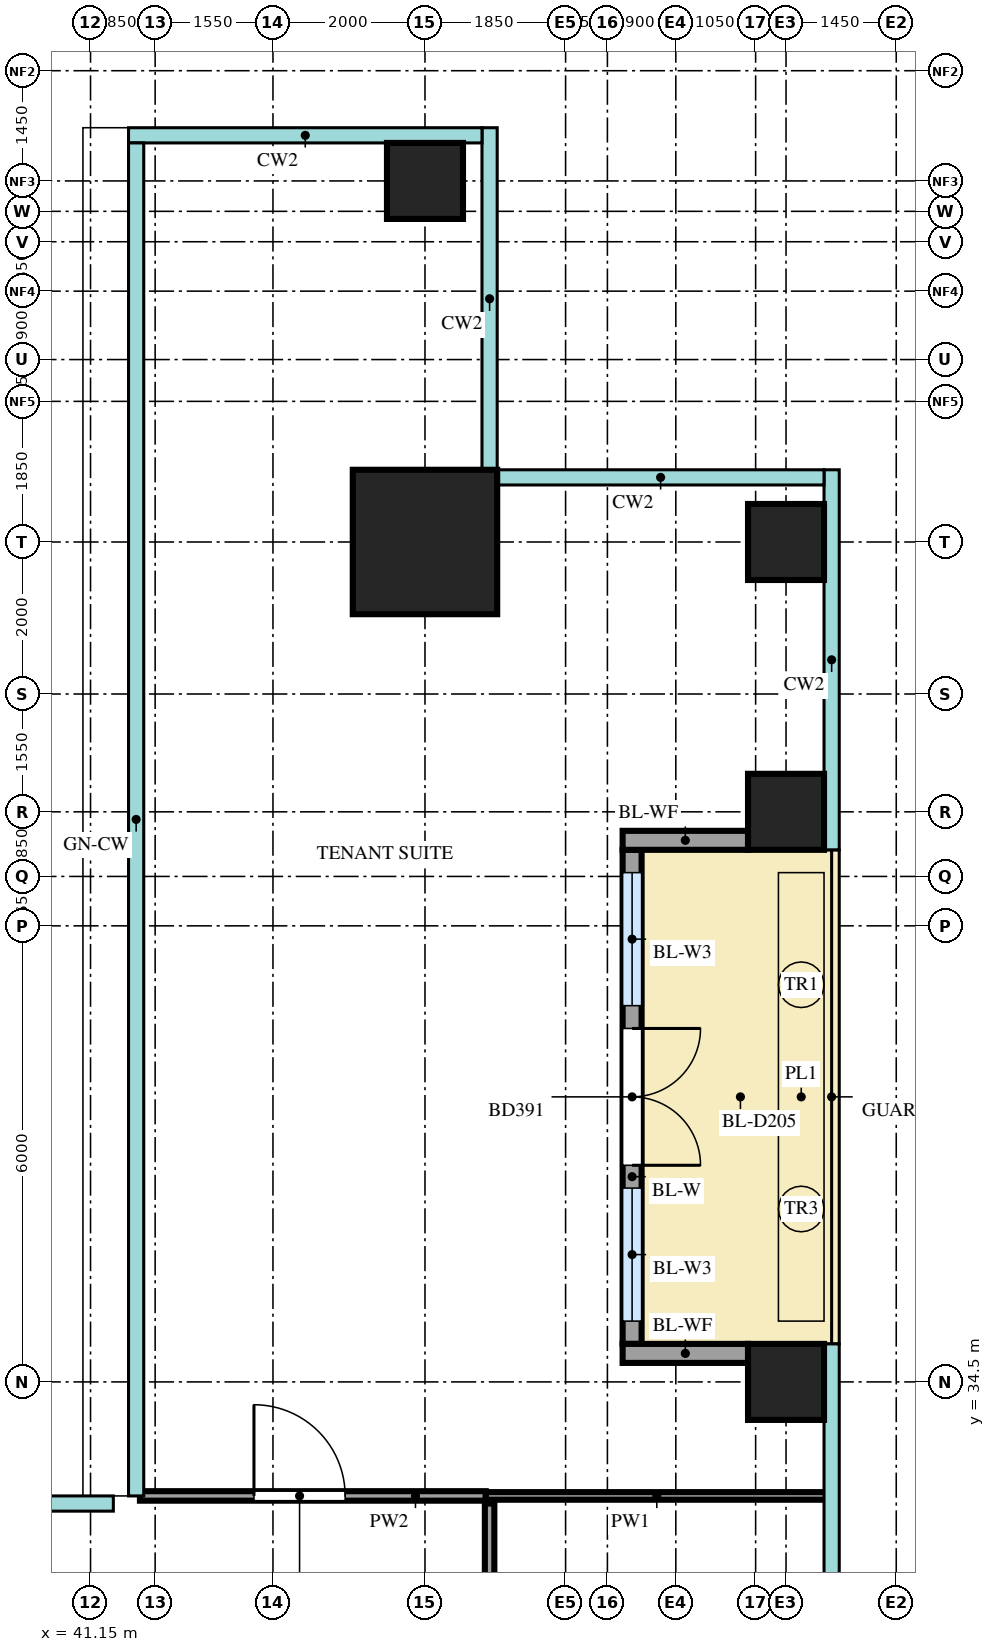
"""IFC4 building model, lengths in metres.
Left out: names, types, materials, properties, quantities, classifications, styles, units other than length and angle.
Written with IfcOpenShell. Run it as: python <this file> out.ifc"""

import sys

from ifc_helpers import new_model, si_unit, direction, frame, frame_2d, origin, origin_2d, place, context, subcontext, project, spatial, rectangle, extrude, source, transform, mapped, element, fill, save


model = new_model("IFC4")
c1 = context("Model", 3, precision=1e-05, world=origin(), true_north=direction((0.0, 1.0)))
c2 = subcontext(c1, "Body", "Model", "MODEL_VIEW")
j1 = project(units=[si_unit("LENGTHUNIT", "METRE"), si_unit("PLANEANGLEUNIT", "RADIAN")], contexts=[c1])
p1 = place(None, origin())
s1 = spatial("IfcSite", under=j1, at=p1, CompositionType="ELEMENT")
p2 = place(p1, origin())
s2 = spatial("IfcBuilding", under=s1, at=p2, CompositionType="ELEMENT")
p3 = place(p2, frame((0.0, 0.0, 180.7)))
s3 = spatial("IfcBuildingStorey", under=s2, at=p3, CompositionType="ELEMENT", Elevation=180.7)
m1 = source(origin(), c2, "Body", "SweptSolid", [
    extrude(rectangle(XDim=1.9, YDim=1.9, at=origin_2d()), origin(), (0.0, 0.0, 1.0), 4.0),
])
p4 = place(p3, frame((45.55, 45.55, 0.0), z_axis=(0.0, 0.0, 1.0), x_axis=(1.0, 0.0, 0.0)))
e1 = element("IfcColumn", 1, at=p4, inside=s3, PredefinedType="COLUMN", context=c2, shape_type="MappedRepresentation", body=[
    mapped(m1, transform((0.0, 0.0, 0.0))),
])
m2 = source(origin(), c2, "Body", "SweptSolid", [
    extrude(rectangle(XDim=1.0, YDim=1.0, at=origin_2d()), origin(), (0.0, 0.0, 1.0), 3.75),
])
for number, where, z_axis, x_axis in (
    (2, (50.3, 34.5, 0.0), (0.0, 0.0, 1.0), (1.0, 0.0, 0.0)),
    (3, (50.3, 42.0, 0.0), (0.0, 0.0, 1.0), (1.0, 0.0, 0.0)),
    (4, (50.3, 45.55, 0.0), (0.0, 0.0, 1.0), (1.0, 0.0, 0.0)),
    (5, (45.55, 50.3, 0.0), (0.0, 0.0, 1.0), (1.0, 0.0, 0.0)),
):
    element("IfcColumn", number, at=place(p3, frame(where, z_axis=z_axis, x_axis=x_axis)), inside=s3, PredefinedType="COLUMN", context=c2, shape_type="MappedRepresentation", body=[
        mapped(m2, transform((0.0, 0.0, 0.0))),
    ])
m3 = source(origin(), c2, "Body", "SweptSolid", [
    extrude(rectangle(XDim=6.5, YDim=0.25, at=frame_2d((3.25, 0.0))), origin(), (0.0, 0.0, 1.0), 3.75),
])
p5 = place(p3, frame((48.275, 35.0, 0.0), z_axis=(0.0, 0.0, 1.0), x_axis=(0.0, 1.0, 0.0)))
e6 = element("IfcWall", 6, at=p5, inside=s3, PredefinedType="SOLIDWALL", context=c2, shape_type="MappedRepresentation", body=[
    mapped(m3, transform((0.0, 0.0, 0.0))),
])
m4 = source(origin(), c2, "Body", "SweptSolid", [
    extrude(rectangle(XDim=1.75, YDim=2.4, at=frame_2d((0.875, 1.2))), frame((0.0, 0.135, 0.0), z_axis=(0.0, -1.0, 0.0), x_axis=(1.0, 0.0, 0.0)), (0.0, 0.0, 1.0), 0.27),
])
p6 = place(p5, frame((0.3, 0.0, 0.0)))
e7 = element("IfcOpeningElement", 7, at=p6, cuts=e6, PredefinedType="OPENING", context=c2, shape_type="MappedRepresentation", body=[
    mapped(m4, transform((0.0, 0.0, 0.0))),
])
p7 = place(p5, frame((4.45, 0.0, 0.0)))
e8 = element("IfcOpeningElement", 8, at=p7, cuts=e6, PredefinedType="OPENING", context=c2, shape_type="MappedRepresentation", body=[
    mapped(m4, transform((0.0, 0.0, 0.0))),
])
m5 = source(origin(), c2, "Body", "SweptSolid", [
    extrude(rectangle(XDim=1.8, YDim=2.4, at=frame_2d((0.9, 1.2))), frame((0.0, 0.135, 0.0), z_axis=(0.0, -1.0, 0.0), x_axis=(1.0, 0.0, 0.0)), (0.0, 0.0, 1.0), 0.27),
])
p8 = place(p5, frame((2.35, 0.0, 0.0)))
e9 = element("IfcOpeningElement", 9, at=p8, cuts=e6, PredefinedType="OPENING", context=c2, shape_type="MappedRepresentation", body=[
    mapped(m5, transform((0.0, 0.0, 0.0))),
])
m6 = source(origin(), c2, "Body", "SweptSolid", [
    extrude(rectangle(XDim=1.65, YDim=0.25, at=frame_2d((0.825, 0.0))), origin(), (0.0, 0.0, 1.0), 3.45),
])
for number, where, z_axis, x_axis in (
    (10, (49.8, 34.875, 0.0), (0.0, 0.0, 1.0), (-1.0, 0.0, 0.0)),
    (11, (49.8, 41.625, 0.0), (0.0, 0.0, 1.0), (-1.0, 0.0, 0.0)),
):
    element("IfcWall", number, at=place(p3, frame(where, z_axis=z_axis, x_axis=x_axis)), inside=s3, PredefinedType="SOLIDWALL", context=c2, shape_type="MappedRepresentation", body=[
        mapped(m6, transform((0.0, 0.0, 0.0))),
    ])
m7 = source(origin(), c2, "Body", "SweptSolid", [
    extrude(rectangle(XDim=3.2, YDim=0.125, at=frame_2d((1.6, 0.0))), origin(), (0.0, 0.0, 1.0), 3.8),
])
p9 = place(p3, frame((46.4, 29.7, 0.0), z_axis=(0.0, 0.0, 1.0), x_axis=(0.0, 1.0, 0.0)))
e12 = element("IfcWall", 12, at=p9, inside=s3, PredefinedType="PARTITIONING", context=c2, shape_type="MappedRepresentation", body=[
    mapped(m7, transform((0.0, 0.0, 0.0))),
])
m8 = source(origin(), c2, "Body", "SweptSolid", [
    extrude(rectangle(XDim=0.9, YDim=2.1, at=frame_2d((0.45, 1.05))), frame((0.0, 0.073, 0.0), z_axis=(0.0, -1.0, 0.0), x_axis=(1.0, 0.0, 0.0)), (0.0, 0.0, 1.0), 0.145),
])
p10 = place(p9, frame((1.15, 0.0, 0.0)))
e13 = element("IfcOpeningElement", 13, at=p10, cuts=e12, PredefinedType="OPENING", context=c2, shape_type="MappedRepresentation", body=[
    mapped(m8, transform((0.0, 0.0, 0.0))),
])
m9 = source(origin(), c2, "Body", "SweptSolid", [
    extrude(rectangle(XDim=4.55, YDim=0.125, at=frame_2d((2.275, 0.0))), origin(), (0.0, 0.0, 1.0), 3.8),
])
p11 = place(p3, frame((41.8, 33.0, 0.0), z_axis=(0.0, 0.0, 1.0), x_axis=(1.0, 0.0, 0.0)))
e14 = element("IfcWall", 14, at=p11, inside=s3, PredefinedType="PARTITIONING", context=c2, shape_type="MappedRepresentation", body=[
    mapped(m9, transform((0.0, 0.0, 0.0))),
])
m10 = source(origin(), c2, "Body", "SweptSolid", [
    extrude(rectangle(XDim=1.2, YDim=2.1, at=frame_2d((0.6, 1.05))), frame((0.0, 0.073, 0.0), z_axis=(0.0, -1.0, 0.0), x_axis=(1.0, 0.0, 0.0)), (0.0, 0.0, 1.0), 0.145),
])
p12 = place(p11, frame((1.5, 0.0, 0.0)))
e15 = element("IfcOpeningElement", 15, at=p12, cuts=e14, PredefinedType="OPENING", context=c2, shape_type="MappedRepresentation", body=[
    mapped(m10, transform((0.0, 0.0, 0.0))),
])
m11 = source(origin(), c2, "Body", "SweptSolid", [
    extrude(rectangle(XDim=4.5, YDim=0.1, at=frame_2d((2.25, 0.0))), origin(), (0.0, 0.0, 1.0), 3.8),
])
p13 = place(p3, frame((46.35, 33.0, 0.0), z_axis=(0.0, 0.0, 1.0), x_axis=(1.0, 0.0, 0.0)))
e16 = element("IfcWall", 16, at=p13, inside=s3, PredefinedType="PARTITIONING", context=c2, shape_type="MappedRepresentation", body=[
    mapped(m11, transform((0.0, 0.0, 0.0))),
])
m12 = source(origin(), c2, "Body", "SweptSolid", [
    extrude(rectangle(XDim=1.75, YDim=2.4, at=frame_2d((0.875, 1.2))), frame((0.0, 0.03, 0.0), z_axis=(0.0, -1.0, 0.0), x_axis=(1.0, 0.0, 0.0)), (0.0, 0.0, 1.0), 0.06),
])
p14 = place(p6, origin())
e17 = element("IfcWindow", 17, at=p14, inside=s3, PartitioningType="SINGLE_PANEL", PredefinedType="WINDOW", context=c2, shape_type="MappedRepresentation", body=[
    mapped(m12, transform((0.0, 0.0, 0.0))),
])
fill(e7, e17)
p15 = place(p7, origin())
e18 = element("IfcWindow", 18, at=p15, inside=s3, PartitioningType="SINGLE_PANEL", PredefinedType="WINDOW", context=c2, shape_type="MappedRepresentation", body=[
    mapped(m12, transform((0.0, 0.0, 0.0))),
])
fill(e8, e18)
m13 = source(origin(), c2, "Body", "SweptSolid", [
    extrude(rectangle(XDim=1.8, YDim=2.4, at=frame_2d((0.9, 1.2))), frame((0.0, 0.025, 0.0), z_axis=(0.0, -1.0, 0.0), x_axis=(1.0, 0.0, 0.0)), (0.0, 0.0, 1.0), 0.05),
])
p16 = place(p8, origin())
e19 = element("IfcDoor", 19, at=p16, inside=s3, OperationType="DOUBLE_DOOR_DOUBLE_SWING", PredefinedType="DOOR", context=c2, shape_type="MappedRepresentation", body=[
    mapped(m13, transform((0.0, 0.0, 0.0))),
])
fill(e9, e19)
m14 = source(origin(), c2, "Body", "SweptSolid", [
    extrude(rectangle(XDim=1.2, YDim=2.1, at=frame_2d((0.6, 1.05))), frame((0.0, 0.025, 0.0), z_axis=(0.0, -1.0, 0.0), x_axis=(1.0, 0.0, 0.0)), (0.0, 0.0, 1.0), 0.05),
])
p17 = place(p12, origin())
e20 = element("IfcDoor", 20, at=p17, inside=s3, OperationType="SINGLE_SWING_RIGHT", PredefinedType="DOOR", context=c2, shape_type="MappedRepresentation", body=[
    mapped(m14, transform((0.0, 0.0, 0.0))),
])
fill(e15, e20)
save(model, sys.argv[1])
